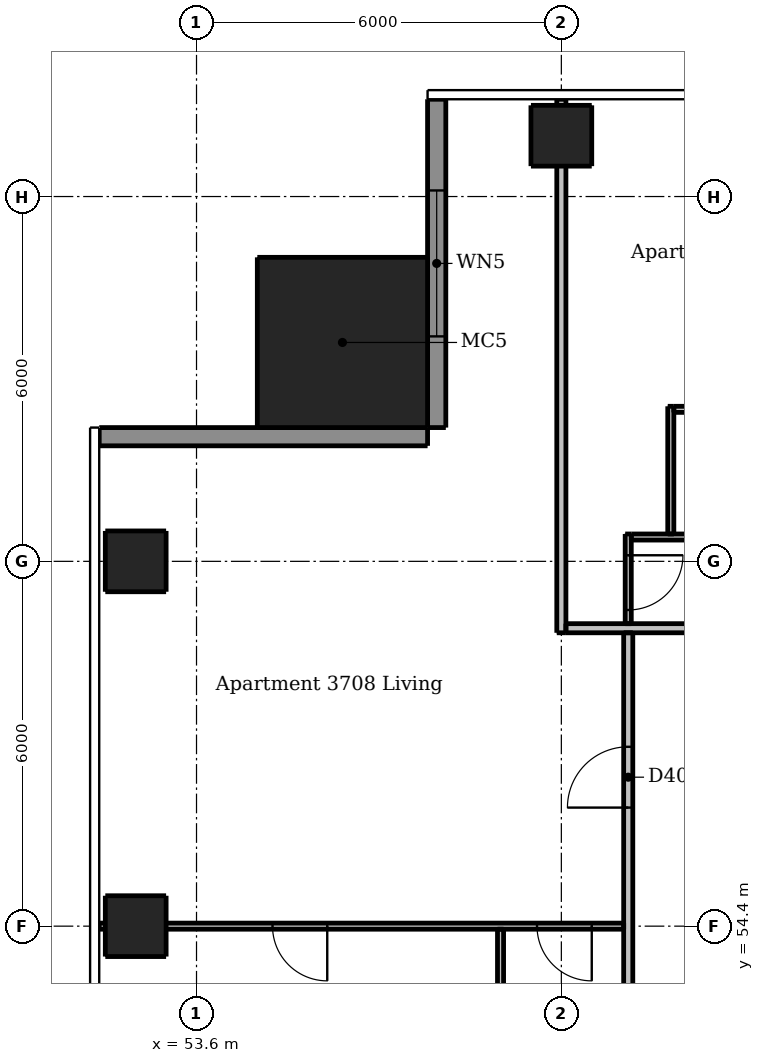
"""IFC4 building model, lengths in metres.
Left out: names, types, materials, properties, quantities, classifications, styles, units other than length and angle.
Written with IfcOpenShell. Run it as: python <this file> out.ifc"""

import sys

from ifc_helpers import new_model, si_unit, direction, frame, frame_2d, origin, origin_2d, place, context, subcontext, project, spatial, rectangle, extrude, element, fill, save


model = new_model("IFC4")
c1 = context("Model", 3, precision=1e-05, world=origin(), true_north=direction((0.0, 1.0)))
c2 = subcontext(c1, "Body", "Model", "MODEL_VIEW")
j1 = project(units=[si_unit("LENGTHUNIT", "METRE"), si_unit("PLANEANGLEUNIT", "RADIAN")], contexts=[c1])
p1 = place(None, origin())
s1 = spatial("IfcSite", under=j1, at=p1, CompositionType="ELEMENT")
p2 = place(p1, origin())
s2 = spatial("IfcBuilding", under=s1, at=p2, CompositionType="ELEMENT")
p3 = place(p2, frame((0.0, 0.0, 140.5)))
s3 = spatial("IfcBuildingStorey", under=s2, at=p3, CompositionType="ELEMENT", Elevation=140.5)
for number, where, z_axis, x_axis in (
    (1, (59.6, 67.4, 0.0), (0.0, 0.0, 1.0), (1.0, 0.0, 0.0)),
    (2, (52.6, 54.4, 0.0), (0.0, 0.0, 1.0), (1.0, 0.0, 0.0)),
    (3, (52.6, 60.4, 0.0), (0.0, 0.0, 1.0), (1.0, 0.0, 0.0)),
):
    element("IfcColumn", number, at=place(p3, frame(where, z_axis=z_axis, x_axis=x_axis)), inside=s3, PredefinedType="COLUMN", context=c2, shape_type="SweptSolid", body=[
        extrude(rectangle(XDim=1.0, YDim=1.0, at=origin_2d()), origin(), (0.0, 0.0, 1.0), 3.05),
    ])
p4 = place(p3, frame((56.0, 64.0, 0.0), z_axis=(0.0, 0.0, 1.0), x_axis=(1.0, 0.0, 0.0)))
e4 = element("IfcColumn", 4, at=p4, inside=s3, PredefinedType="COLUMN", context=c2, shape_type="SweptSolid", body=[
    extrude(rectangle(XDim=2.8, YDim=2.8, at=origin_2d()), origin(), (0.0, 0.0, 1.0), 3.3),
])
p5 = place(p3, frame((57.55, 68.0, 0.0), z_axis=(0.0, 0.0, 1.0), x_axis=(0.0, -1.0, 0.0)))
e5 = element("IfcWall", 5, at=p5, inside=s3, PredefinedType="SOLIDWALL", context=c2, shape_type="SweptSolid", body=[
    extrude(rectangle(XDim=5.4, YDim=0.3, at=frame_2d((2.7, 0.0))), origin(), (0.0, 0.0, 1.0), 3.05),
])
p6 = place(p5, frame((1.5, 0.0, 0.15)))
e6 = element("IfcOpeningElement", 6, at=p6, cuts=e5, PredefinedType="OPENING", context=c2, shape_type="SweptSolid", body=[
    extrude(rectangle(XDim=2.4, YDim=2.1, at=frame_2d((1.2, 1.05))), frame((0.0, 0.16, 0.0), z_axis=(0.0, -1.0, 0.0), x_axis=(1.0, 0.0, 0.0)), (0.0, 0.0, 1.0), 0.32),
])
p7 = place(p3, frame((57.4, 62.45, 0.0), z_axis=(0.0, 0.0, 1.0), x_axis=(-1.0, 0.0, 0.0)))
e7 = element("IfcWall", 7, at=p7, inside=s3, PredefinedType="SOLIDWALL", context=c2, shape_type="SweptSolid", body=[
    extrude(rectangle(XDim=5.4, YDim=0.3, at=frame_2d((2.7, 0.0))), origin(), (0.0, 0.0, 1.0), 3.05),
])
p8 = place(p3, frame((58.6, 54.35, 0.0), z_axis=(0.0, 0.0, 1.0), x_axis=(0.0, -1.0, 0.0)))
e8 = element("IfcWall", 8, at=p8, inside=s3, PredefinedType="PARTITIONING", context=c2, shape_type="SweptSolid", body=[
    extrude(rectangle(XDim=5.875, YDim=0.1, at=frame_2d((2.938, 0.0))), origin(), (0.0, 0.0, 1.0), 3.05),
])
p9 = place(p8, frame((3.75, 0.0, 0.0)))
e9 = element("IfcOpeningElement", 9, at=p9, cuts=e8, PredefinedType="OPENING", context=c2, shape_type="SweptSolid", body=[
    extrude(rectangle(XDim=0.8, YDim=2.1, at=frame_2d((0.4, 1.05))), frame((0.0, 0.06, 0.0), z_axis=(0.0, -1.0, 0.0), x_axis=(1.0, 0.0, 0.0)), (0.0, 0.0, 1.0), 0.12),
])
p10 = place(p3, frame((60.7, 60.85, 0.0), z_axis=(0.0, 0.0, 1.0), x_axis=(0.0, -1.0, 0.0)))
e10 = element("IfcWall", 10, at=p10, inside=s3, PredefinedType="PARTITIONING", context=c2, shape_type="SweptSolid", body=[
    extrude(rectangle(XDim=1.475, YDim=0.1, at=frame_2d((0.738, 0.0))), origin(), (0.0, 0.0, 1.0), 3.05),
])
p11 = place(p10, frame((0.35, 0.0, 0.0)))
e11 = element("IfcOpeningElement", 11, at=p11, cuts=e10, PredefinedType="OPENING", context=c2, shape_type="SweptSolid", body=[
    extrude(rectangle(XDim=0.9, YDim=2.1, at=frame_2d((0.45, 1.05))), frame((0.0, 0.06, 0.0), z_axis=(0.0, -1.0, 0.0), x_axis=(1.0, 0.0, 0.0)), (0.0, 0.0, 1.0), 0.12),
])
p12 = place(p3, frame((61.4, 60.85, 0.0), z_axis=(0.0, 0.0, 1.0), x_axis=(0.0, 1.0, 0.0)))
e12 = element("IfcWall", 12, at=p12, inside=s3, PredefinedType="PARTITIONING", context=c2, shape_type="SweptSolid", body=[
    extrude(rectangle(XDim=2.1, YDim=0.1, at=frame_2d((1.05, 0.0))), origin(), (0.0, 0.0, 1.0), 3.05),
])
p13 = place(p3, frame((61.45, 62.9, 0.0), z_axis=(0.0, 0.0, 1.0), x_axis=(1.0, 0.0, 0.0)))
e13 = element("IfcWall", 13, at=p13, inside=s3, PredefinedType="PARTITIONING", context=c2, shape_type="SweptSolid", body=[
    extrude(rectangle(XDim=6.5, YDim=0.1, at=frame_2d((3.25, 0.0))), origin(), (0.0, 0.0, 1.0), 3.05),
])
p14 = place(p3, frame((60.75, 60.8, 0.0), z_axis=(0.0, 0.0, 1.0), x_axis=(1.0, 0.0, 0.0)))
e14 = element("IfcWall", 14, at=p14, inside=s3, PredefinedType="PARTITIONING", context=c2, shape_type="SweptSolid", body=[
    extrude(rectangle(XDim=16.775, YDim=0.1, at=frame_2d((8.387, 0.0))), origin(), (0.0, 0.0, 1.0), 3.05),
])
p15 = place(p14, frame((3.2, 0.0, 0.0)))
e15 = element("IfcOpeningElement", 15, at=p15, cuts=e14, PredefinedType="OPENING", context=c2, shape_type="SweptSolid", body=[
    extrude(rectangle(XDim=0.9, YDim=2.1, at=frame_2d((0.45, 1.05))), frame((0.0, 0.06, 0.0), z_axis=(0.0, -1.0, 0.0), x_axis=(1.0, 0.0, 0.0)), (0.0, 0.0, 1.0), 0.12),
])
p16 = place(p14, frame((1.1, 0.0, 0.0)))
e16 = element("IfcOpeningElement", 16, at=p16, cuts=e14, PredefinedType="OPENING", context=c2, shape_type="SweptSolid", body=[
    extrude(rectangle(XDim=0.9, YDim=2.1, at=frame_2d((0.45, 1.05))), frame((0.0, 0.06, 0.0), z_axis=(0.0, -1.0, 0.0), x_axis=(1.0, 0.0, 0.0)), (0.0, 0.0, 1.0), 0.12),
])
p17 = place(p14, frame((8.6, 0.0, 0.0)))
e17 = element("IfcOpeningElement", 17, at=p17, cuts=e14, PredefinedType="OPENING", context=c2, shape_type="SweptSolid", body=[
    extrude(rectangle(XDim=0.9, YDim=2.1, at=frame_2d((0.45, 1.05))), frame((0.0, 0.06, 0.0), z_axis=(0.0, -1.0, 0.0), x_axis=(1.0, 0.0, 0.0)), (0.0, 0.0, 1.0), 0.12),
])
p18 = place(p14, frame((14.6, 0.0, 0.0)))
e18 = element("IfcOpeningElement", 18, at=p18, cuts=e14, PredefinedType="OPENING", context=c2, shape_type="SweptSolid", body=[
    extrude(rectangle(XDim=0.9, YDim=2.1, at=frame_2d((0.45, 1.05))), frame((0.0, 0.06, 0.0), z_axis=(0.0, -1.0, 0.0), x_axis=(1.0, 0.0, 0.0)), (0.0, 0.0, 1.0), 0.12),
])
p19 = place(p14, frame((5.65, 0.0, 0.0)))
e19 = element("IfcOpeningElement", 19, at=p19, cuts=e14, PredefinedType="OPENING", context=c2, shape_type="SweptSolid", body=[
    extrude(rectangle(XDim=0.8, YDim=2.1, at=frame_2d((0.4, 1.05))), frame((0.0, 0.06, 0.0), z_axis=(0.0, -1.0, 0.0), x_axis=(1.0, 0.0, 0.0)), (0.0, 0.0, 1.0), 0.12),
])
p20 = place(p14, frame((11.65, 0.0, 0.0)))
e20 = element("IfcOpeningElement", 20, at=p20, cuts=e14, PredefinedType="OPENING", context=c2, shape_type="SweptSolid", body=[
    extrude(rectangle(XDim=0.8, YDim=2.1, at=frame_2d((0.4, 1.05))), frame((0.0, 0.06, 0.0), z_axis=(0.0, -1.0, 0.0), x_axis=(1.0, 0.0, 0.0)), (0.0, 0.0, 1.0), 0.12),
])
p21 = place(p3, frame((60.625, 54.4, 0.0), z_axis=(0.0, 0.0, 1.0), x_axis=(-1.0, 0.0, 0.0)))
e21 = element("IfcWall", 21, at=p21, inside=s3, PredefinedType="PARTITIONING", context=c2, shape_type="SweptSolid", body=[
    extrude(rectangle(XDim=8.625, YDim=0.1, at=frame_2d((4.312, 0.0))), origin(), (0.0, 0.0, 1.0), 2.516),
])
p22 = place(p21, frame((0.525, 0.0, 0.0)))
e22 = element("IfcOpeningElement", 22, at=p22, cuts=e21, PredefinedType="OPENING", context=c2, shape_type="SweptSolid", body=[
    extrude(rectangle(XDim=0.9, YDim=2.1, at=frame_2d((0.45, 1.05))), frame((0.0, 0.06, 0.0), z_axis=(0.0, -1.0, 0.0), x_axis=(1.0, 0.0, 0.0)), (0.0, 0.0, 1.0), 0.12),
])
p23 = place(p21, frame((4.875, 0.0, 0.0)))
e23 = element("IfcOpeningElement", 23, at=p23, cuts=e21, PredefinedType="OPENING", context=c2, shape_type="SweptSolid", body=[
    extrude(rectangle(XDim=0.9, YDim=2.1, at=frame_2d((0.45, 1.05))), frame((0.0, 0.06, 0.0), z_axis=(0.0, -1.0, 0.0), x_axis=(1.0, 0.0, 0.0)), (0.0, 0.0, 1.0), 0.12),
])
p24 = place(p3, frame((59.6, 59.225, 0.0), z_axis=(0.0, 0.0, 1.0), x_axis=(0.0, 1.0, 0.0)))
e24 = element("IfcWall", 24, at=p24, inside=s3, PredefinedType="PARTITIONING", context=c2, shape_type="SweptSolid", body=[
    extrude(rectangle(XDim=8.775, YDim=0.15, at=frame_2d((4.387, 0.0))), origin(), (0.0, 0.0, 1.0), 2.51),
])
p25 = place(p3, frame((60.7, 30.325, 0.0), z_axis=(0.0, 0.0, 1.0), x_axis=(0.0, 1.0, 0.0)))
e25 = element("IfcWall", 25, at=p25, inside=s3, PredefinedType="PARTITIONING", context=c2, shape_type="SweptSolid", body=[
    extrude(rectangle(XDim=28.9, YDim=0.15, at=frame_2d((14.45, 0.0))), origin(), (0.0, 0.0, 1.0), 3.05),
])
p26 = place(p25, frame((9.225, 0.0, 0.0)))
e26 = element("IfcOpeningElement", 26, at=p26, cuts=e25, PredefinedType="OPENING", context=c2, shape_type="SweptSolid", body=[
    extrude(rectangle(XDim=1.0, YDim=2.1, at=frame_2d((0.5, 1.05))), frame((0.0, 0.085, 0.0), z_axis=(0.0, -1.0, 0.0), x_axis=(1.0, 0.0, 0.0)), (0.0, 0.0, 1.0), 0.17),
])
p27 = place(p25, frame((26.025, 0.0, 0.0)))
e27 = element("IfcOpeningElement", 27, at=p27, cuts=e25, PredefinedType="OPENING", context=c2, shape_type="SweptSolid", body=[
    extrude(rectangle(XDim=1.0, YDim=2.1, at=frame_2d((0.5, 1.05))), frame((0.0, 0.085, 0.0), z_axis=(0.0, -1.0, 0.0), x_axis=(1.0, 0.0, 0.0)), (0.0, 0.0, 1.0), 0.17),
])
p28 = place(p3, frame((59.675, 59.3, 0.0), z_axis=(0.0, 0.0, 1.0), x_axis=(1.0, 0.0, 0.0)))
e28 = element("IfcWall", 28, at=p28, inside=s3, PredefinedType="PARTITIONING", context=c2, shape_type="SweptSolid", body=[
    extrude(rectangle(XDim=28.55, YDim=0.15, at=frame_2d((14.275, 0.0))), origin(), (0.0, 0.0, 1.0), 3.05),
])
p29 = place(p28, frame((8.975, 0.0, 0.0)))
e29 = element("IfcOpeningElement", 29, at=p29, cuts=e28, PredefinedType="OPENING", context=c2, shape_type="SweptSolid", body=[
    extrude(rectangle(XDim=1.0, YDim=2.1, at=frame_2d((0.5, 1.05))), frame((0.0, 0.085, 0.0), z_axis=(0.0, -1.0, 0.0), x_axis=(1.0, 0.0, 0.0)), (0.0, 0.0, 1.0), 0.17),
])
p30 = place(p28, frame((25.775, 0.0, 0.0)))
e30 = element("IfcOpeningElement", 30, at=p30, cuts=e28, PredefinedType="OPENING", context=c2, shape_type="SweptSolid", body=[
    extrude(rectangle(XDim=1.0, YDim=2.1, at=frame_2d((0.5, 1.05))), frame((0.0, 0.085, 0.0), z_axis=(0.0, -1.0, 0.0), x_axis=(1.0, 0.0, 0.0)), (0.0, 0.0, 1.0), 0.17),
])
p31 = place(p6, origin())
e31 = element("IfcWindow", 31, at=p31, inside=s3, PartitioningType="DOUBLE_PANEL_VERTICAL", PredefinedType="WINDOW", context=c2, shape_type="SweptSolid", body=[
    extrude(rectangle(XDim=2.4, YDim=2.1, at=frame_2d((1.2, 1.05))), frame((0.0, 0.03, 0.0), z_axis=(0.0, -1.0, 0.0), x_axis=(1.0, 0.0, 0.0)), (0.0, 0.0, 1.0), 0.06),
])
fill(e6, e31)
p32 = place(p11, origin())
e32 = element("IfcDoor", 32, at=p32, inside=s3, OperationType="SINGLE_SWING_LEFT", PredefinedType="DOOR", context=c2, shape_type="SweptSolid", body=[
    extrude(rectangle(XDim=0.9, YDim=2.1, at=frame_2d((0.45, 1.05))), frame((0.0, 0.025, 0.0), z_axis=(0.0, -1.0, 0.0), x_axis=(1.0, 0.0, 0.0)), (0.0, 0.0, 1.0), 0.05),
])
fill(e11, e32)
p33 = place(p27, origin())
e33 = element("IfcDoor", 33, at=p33, inside=s3, OperationType="SINGLE_SWING_LEFT", PredefinedType="DOOR", context=c2, shape_type="SweptSolid", body=[
    extrude(rectangle(XDim=1.0, YDim=2.1, at=frame_2d((0.5, 1.05))), frame((0.0, 0.025, 0.0), z_axis=(0.0, -1.0, 0.0), x_axis=(1.0, 0.0, 0.0)), (0.0, 0.0, 1.0), 0.05),
])
fill(e27, e33)
p34 = place(p22, origin())
e34 = element("IfcDoor", 34, at=p34, inside=s3, OperationType="SINGLE_SWING_LEFT", PredefinedType="DOOR", context=c2, shape_type="SweptSolid", body=[
    extrude(rectangle(XDim=0.9, YDim=2.1, at=frame_2d((0.45, 1.05))), frame((0.0, 0.025, 0.0), z_axis=(0.0, -1.0, 0.0), x_axis=(1.0, 0.0, 0.0)), (0.0, 0.0, 1.0), 0.05),
])
fill(e22, e34)
p35 = place(p23, origin())
e35 = element("IfcDoor", 35, at=p35, inside=s3, OperationType="SINGLE_SWING_LEFT", PredefinedType="DOOR", context=c2, shape_type="SweptSolid", body=[
    extrude(rectangle(XDim=0.9, YDim=2.1, at=frame_2d((0.45, 1.05))), frame((0.0, 0.025, 0.0), z_axis=(0.0, -1.0, 0.0), x_axis=(1.0, 0.0, 0.0)), (0.0, 0.0, 1.0), 0.05),
])
fill(e23, e35)
save(model, sys.argv[1])
